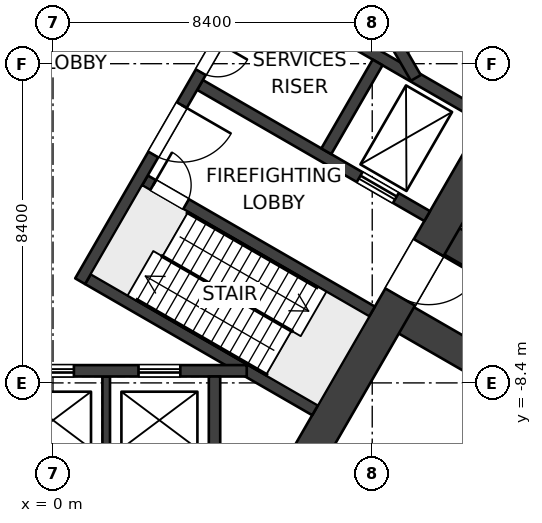
"""IFC4 building model, lengths in metres.
Left out: names, types, materials, properties, quantities, classifications, styles, units other than length and angle.
Written with IfcOpenShell. Run it as: python <this file> out.ifc"""

import sys

from ifc_helpers import new_model, si_unit, direction, frame, frame_2d, origin, place, context, subcontext, project, spatial, polyline, rectangle, outline, extrude, element, fill, save


model = new_model("IFC4")
c1 = context("Model", 3, precision=1e-05, world=origin(), true_north=direction((0.0, 1.0)))
c2 = subcontext(c1, "Body", "Model", "MODEL_VIEW")
j1 = project(units=[si_unit("LENGTHUNIT", "METRE"), si_unit("PLANEANGLEUNIT", "RADIAN")], contexts=[c1])
p1 = place(None, origin())
s1 = spatial("IfcSite", under=j1, at=p1, CompositionType="ELEMENT")
p2 = place(p1, origin())
s2 = spatial("IfcBuilding", under=s1, at=p2, CompositionType="ELEMENT")
p3 = place(p2, frame((0.0, 0.0, 11.0)))
s3 = spatial("IfcBuildingStorey", under=s2, at=p3, CompositionType="ELEMENT", Elevation=11.0)
p4 = place(p3, frame((12.551, -0.225, 0.0), z_axis=(0.0, 0.0, 1.0), x_axis=(-0.499997612506, -0.8660267822, 0.0)))
e1 = element("IfcWall", 1, at=p4, inside=s3, PredefinedType="SHEAR", context=c2, shape_type="SweptSolid", body=[
    extrude(rectangle(XDim=12.161, YDim=0.9, at=frame_2d((6.08, 0.0))), origin(), (0.0, 0.0, 1.0), 5.0),
])
p5 = place(p4, frame((5.33, 0.0, 0.0)))
e2 = element("IfcOpeningElement", 2, at=p5, cuts=e1, PredefinedType="OPENING", context=c2, shape_type="SweptSolid", body=[
    extrude(rectangle(XDim=1.5, YDim=2.1, at=frame_2d((0.75, 1.05))), frame((0.0, 0.46, 0.0), z_axis=(0.0, -1.0, 0.0), x_axis=(1.0, 0.0, 0.0)), (0.0, 0.0, 1.0), 0.92),
])
p6 = place(p3, origin())
e3 = element("IfcWall", 3, at=p6, inside=s3, PredefinedType="SHEAR", context=c2, shape_type="SweptSolid", body=[
    extrude(outline(polyline([(13.2, 0.0), (6.6, 11.432), (6.08, 11.432), (6.08, 10.531), (12.161, 0.0), (12.94, -0.45), (13.2, 0.0)])), origin(), (0.0, 0.0, 1.0), 5.0),
])
p7 = place(p3, frame((5.314, 2.244, 0.0), z_axis=(0.0, 0.0, 1.0), x_axis=(-0.499995050369, -0.866028261437, 0.0)))
e4 = element("IfcWall", 4, at=p7, inside=s3, PredefinedType="SHEAR", context=c2, shape_type="SweptSolid", body=[
    extrude(rectangle(XDim=9.2, YDim=0.3, at=frame_2d((4.6, 0.0))), origin(), (0.0, 0.0, 1.0), 5.0),
])
p8 = place(p7, frame((3.85, 0.0, 0.0)))
e5 = element("IfcOpeningElement", 5, at=p8, cuts=e4, PredefinedType="OPENING", context=c2, shape_type="SweptSolid", body=[
    extrude(rectangle(XDim=1.5, YDim=2.1, at=frame_2d((0.75, 1.05))), frame((0.0, 0.16, 0.0), z_axis=(0.0, -1.0, 0.0), x_axis=(1.0, 0.0, 0.0)), (0.0, 0.0, 1.0), 0.32),
])
p9 = place(p7, frame((1.95, 0.0, 0.0)))
e6 = element("IfcOpeningElement", 6, at=p9, cuts=e4, PredefinedType="OPENING", context=c2, shape_type="SweptSolid", body=[
    extrude(rectangle(XDim=0.9, YDim=2.1, at=frame_2d((0.45, 1.05))), frame((0.0, 0.16, 0.0), z_axis=(0.0, -1.0, 0.0), x_axis=(1.0, 0.0, 0.0)), (0.0, 0.0, 1.0), 0.32),
])
p10 = place(p3, frame((2.419, -3.071, 0.0), z_axis=(0.0, 0.0, 1.0), x_axis=(0.86602711848, -0.499997030048, 0.0)))
e7 = element("IfcWall", 7, at=p10, inside=s3, PredefinedType="SHEAR", context=c2, shape_type="SweptSolid", body=[
    extrude(rectangle(XDim=6.901, YDim=0.3, at=frame_2d((3.451, 0.0))), origin(), (0.0, 0.0, 1.0), 5.0),
])
p11 = place(p10, frame((0.25, 0.0, 0.0)))
e8 = element("IfcOpeningElement", 8, at=p11, cuts=e7, PredefinedType="OPENING", context=c2, shape_type="SweptSolid", body=[
    extrude(rectangle(XDim=1.0, YDim=2.1, at=frame_2d((0.5, 1.05))), frame((0.0, 0.16, 0.0), z_axis=(0.0, -1.0, 0.0), x_axis=(1.0, 0.0, 0.0)), (0.0, 0.0, 1.0), 0.32),
])
p12 = place(p3, frame((0.919, -5.669, 0.0), z_axis=(0.0, 0.0, 1.0), x_axis=(0.866011800373, -0.500023561059, 0.0)))
e9 = element("IfcWall", 9, at=p12, inside=s3, PredefinedType="SHEAR", context=c2, shape_type="SweptSolid", body=[
    extrude(rectangle(XDim=6.902, YDim=0.3, at=frame_2d((3.451, 0.0))), origin(), (0.0, 0.0, 1.0), 5.0),
])
p13 = place(p3, frame((3.869, -0.559, 0.0), z_axis=(0.0, 0.0, 1.0), x_axis=(0.86602711848, -0.499997030048, 0.0)))
e10 = element("IfcWall", 10, at=p13, inside=s3, PredefinedType="SHEAR", context=c2, shape_type="SweptSolid", body=[
    extrude(rectangle(XDim=6.901, YDim=0.3, at=frame_2d((3.451, 0.0))), origin(), (0.0, 0.0, 1.0), 5.0),
])
p14 = place(p13, frame((4.85, 0.0, 0.0)))
e11 = element("IfcOpeningElement", 11, at=p14, cuts=e10, PredefinedType="OPENING", context=c2, shape_type="SweptSolid", body=[
    extrude(rectangle(XDim=1.1, YDim=2.1, at=frame_2d((0.55, 1.05))), frame((0.0, 0.16, 0.0), z_axis=(0.0, -1.0, 0.0), x_axis=(1.0, 0.0, 0.0)), (0.0, 0.0, 1.0), 0.32),
])
p15 = place(p3, frame((5.369, 2.039, 0.0), z_axis=(0.0, 0.0, 1.0), x_axis=(0.86602711848, -0.499997030048, 0.0)))
e12 = element("IfcWall", 12, at=p15, inside=s3, PredefinedType="SHEAR", context=c2, shape_type="SweptSolid", body=[
    extrude(rectangle(XDim=6.901, YDim=0.3, at=frame_2d((3.451, 0.0))), origin(), (0.0, 0.0, 1.0), 5.0),
])
p16 = place(p3, frame((8.541, 0.034, 0.0), z_axis=(0.0, 0.0, 1.0), x_axis=(-0.50000943426, -0.866019956843, 0.0)))
e13 = element("IfcWall", 13, at=p16, inside=s3, PredefinedType="SHEAR", context=c2, shape_type="SweptSolid", body=[
    extrude(rectangle(XDim=2.7, YDim=0.3, at=frame_2d((1.35, 0.0))), origin(), (0.0, 0.0, 1.0), 5.0),
])
p17 = place(p3, frame((5.098, -8.082, 0.0), z_axis=(0.0, 0.0, 1.0), x_axis=(-1.0, 0.0, 0.0)))
e14 = element("IfcWall", 14, at=p17, inside=s3, PredefinedType="SHEAR", context=c2, shape_type="SweptSolid", body=[
    extrude(rectangle(XDim=10.195, YDim=0.3, at=frame_2d((5.098, 0.0))), origin(), (0.0, 0.0, 1.0), 5.0),
])
p18 = place(p17, frame((1.748, 0.0, 0.0)))
e15 = element("IfcOpeningElement", 15, at=p18, cuts=e14, PredefinedType="OPENING", context=c2, shape_type="SweptSolid", body=[
    extrude(rectangle(XDim=1.1, YDim=2.1, at=frame_2d((0.55, 1.05))), frame((0.0, 0.16, 0.0), z_axis=(0.0, -1.0, 0.0), x_axis=(1.0, 0.0, 0.0)), (0.0, 0.0, 1.0), 0.32),
])
p19 = place(p17, frame((4.548, 0.0, 0.0)))
e16 = element("IfcOpeningElement", 16, at=p19, cuts=e14, PredefinedType="OPENING", context=c2, shape_type="SweptSolid", body=[
    extrude(rectangle(XDim=1.1, YDim=2.1, at=frame_2d((0.55, 1.05))), frame((0.0, 0.16, 0.0), z_axis=(0.0, -1.0, 0.0), x_axis=(1.0, 0.0, 0.0)), (0.0, 0.0, 1.0), 0.32),
])
p20 = place(p17, frame((7.348, 0.0, 0.0)))
e17 = element("IfcOpeningElement", 17, at=p20, cuts=e14, PredefinedType="OPENING", context=c2, shape_type="SweptSolid", body=[
    extrude(rectangle(XDim=1.1, YDim=2.1, at=frame_2d((0.55, 1.05))), frame((0.0, 0.16, 0.0), z_axis=(0.0, -1.0, 0.0), x_axis=(1.0, 0.0, 0.0)), (0.0, 0.0, 1.0), 0.32),
])
p21 = place(p3, frame((4.25, -8.231, 0.0), z_axis=(0.0, 0.0, 1.0), x_axis=(0.0, -1.0, 0.0)))
e18 = element("IfcWall", 18, at=p21, inside=s3, PredefinedType="SHEAR", context=c2, shape_type="SweptSolid", body=[
    extrude(rectangle(XDim=2.3, YDim=0.3, at=frame_2d((1.15, 0.0))), origin(), (0.0, 0.0, 1.0), 5.0),
])
p22 = place(p3, frame((1.4, -8.231, 0.0), z_axis=(0.0, 0.0, 1.0), x_axis=(0.0, -1.0, 0.0)))
e19 = element("IfcWall", 19, at=p22, inside=s3, PredefinedType="SHEAR", context=c2, shape_type="SweptSolid", body=[
    extrude(rectangle(XDim=2.3, YDim=0.2, at=frame_2d((1.15, 0.0))), origin(), (0.0, 0.0, 1.0), 5.0),
])
p23 = place(p3, frame((4.45, 8.455, 0.0), z_axis=(0.0, 0.0, 1.0), x_axis=(0.500002290144, -0.866024081565, 0.0)))
e20 = element("IfcWall", 20, at=p23, inside=s3, PredefinedType="SHEAR", context=c2, shape_type="SweptSolid", body=[
    extrude(rectangle(XDim=10.195, YDim=0.3, at=frame_2d((5.098, 0.0))), origin(), (0.0, 0.0, 1.0), 5.0),
])
p24 = place(p3, frame((9.254, 0.435, 0.0), z_axis=(0.0, 0.0, 1.0), x_axis=(0.866007057882, 0.500031774688, 0.0)))
e21 = element("IfcWall", 21, at=p24, inside=s3, PredefinedType="SHEAR", context=c2, shape_type="SweptSolid", body=[
    extrude(rectangle(XDim=2.3, YDim=0.3, at=frame_2d((1.15, 0.0))), origin(), (0.0, 0.0, 1.0), 5.0),
])
p25 = place(p3, frame((10.11, -4.451, 0.0), z_axis=(0.0, 0.0, 1.0), x_axis=(0.866025284237, -0.500000207062, 0.0)))
e22 = element("IfcWall", 22, at=p25, inside=s3, PredefinedType="SHEAR", context=c2, shape_type="SweptSolid", body=[
    extrude(rectangle(XDim=36.75, YDim=0.8, at=frame_2d((18.375, 0.0))), origin(), (0.0, 0.0, 1.0), 5.0),
])
p26 = place(p25, frame((1.35, 0.0, 0.0)))
e23 = element("IfcOpeningElement", 23, at=p26, cuts=e22, PredefinedType="OPENING", context=c2, shape_type="SweptSolid", body=[
    extrude(rectangle(XDim=1.2, YDim=2.1, at=frame_2d((0.6, 1.05))), frame((0.0, 0.41, 0.0), z_axis=(0.0, -1.0, 0.0), x_axis=(1.0, 0.0, 0.0)), (0.0, 0.0, 1.0), 0.82),
])
p27 = place(p3, frame((8.91, -6.53, 0.0), z_axis=(0.0, 0.0, 1.0), x_axis=(0.866024404313, -0.500001731131, 0.0)))
e24 = element("IfcWall", 24, at=p27, inside=s3, PredefinedType="SHEAR", context=c2, shape_type="SweptSolid", body=[
    extrude(rectangle(XDim=36.953, YDim=0.8, at=frame_2d((18.477, 0.0))), origin(), (0.0, 0.0, 1.0), 5.0),
])
p28 = place(p27, frame((10.0, 0.0, 0.0)))
e25 = element("IfcOpeningElement", 25, at=p28, cuts=e24, PredefinedType="OPENING", context=c2, shape_type="SweptSolid", body=[
    extrude(rectangle(XDim=1.0, YDim=2.1, at=frame_2d((0.5, 1.05))), frame((0.0, 0.41, 0.0), z_axis=(0.0, -1.0, 0.0), x_axis=(1.0, 0.0, 0.0)), (0.0, 0.0, 1.0), 0.82),
])
p29 = place(p27, frame((2.85, 0.0, 0.0)))
e26 = element("IfcOpeningElement", 26, at=p29, cuts=e24, PredefinedType="OPENING", context=c2, shape_type="SweptSolid", body=[
    extrude(rectangle(XDim=1.2, YDim=2.1, at=frame_2d((0.6, 1.05))), frame((0.0, 0.41, 0.0), z_axis=(0.0, -1.0, 0.0), x_axis=(1.0, 0.0, 0.0)), (0.0, 0.0, 1.0), 0.82),
])
p30 = place(p3, frame((9.45, 6.495, 0.0), z_axis=(0.0, 0.0, 1.0), x_axis=(0.866025301493, -0.500000177174, 0.0)))
e27 = element("IfcWall", 27, at=p30, inside=s3, PredefinedType="SOLIDWALL", context=c2, shape_type="SweptSolid", body=[
    extrude(rectangle(XDim=43.095, YDim=0.3, at=frame_2d((21.548, 0.0))), origin(), (0.0, 0.0, 1.0), 4.7),
])
p31 = place(p30, frame((26.595, 0.0, 0.0)))
e28 = element("IfcOpeningElement", 28, at=p31, cuts=e27, PredefinedType="OPENING", context=c2, shape_type="SweptSolid", body=[
    extrude(rectangle(XDim=1.8, YDim=2.4, at=frame_2d((0.9, 1.2))), frame((0.0, 0.16, 0.0), z_axis=(0.0, -1.0, 0.0), x_axis=(1.0, 0.0, 0.0)), (0.0, 0.0, 1.0), 0.32),
])
p32 = place(p18, origin())
e29 = element("IfcDoor", 29, at=p32, inside=s3, OperationType="DOUBLE_DOOR_SLIDING", PredefinedType="DOOR", context=c2, shape_type="SweptSolid", body=[
    extrude(rectangle(XDim=1.1, YDim=2.1, at=frame_2d((0.55, 1.05))), frame((0.0, 0.025, 0.0), z_axis=(0.0, -1.0, 0.0), x_axis=(1.0, 0.0, 0.0)), (0.0, 0.0, 1.0), 0.05),
])
fill(e15, e29)
p33 = place(p19, origin())
e30 = element("IfcDoor", 30, at=p33, inside=s3, OperationType="DOUBLE_DOOR_SLIDING", PredefinedType="DOOR", context=c2, shape_type="SweptSolid", body=[
    extrude(rectangle(XDim=1.1, YDim=2.1, at=frame_2d((0.55, 1.05))), frame((0.0, 0.025, 0.0), z_axis=(0.0, -1.0, 0.0), x_axis=(1.0, 0.0, 0.0)), (0.0, 0.0, 1.0), 0.05),
])
fill(e16, e30)
p34 = place(p14, origin())
e31 = element("IfcDoor", 31, at=p34, inside=s3, OperationType="DOUBLE_DOOR_SLIDING", PredefinedType="DOOR", context=c2, shape_type="SweptSolid", body=[
    extrude(rectangle(XDim=1.1, YDim=2.1, at=frame_2d((0.55, 1.05))), frame((0.0, 0.025, 0.0), z_axis=(0.0, -1.0, 0.0), x_axis=(1.0, 0.0, 0.0)), (0.0, 0.0, 1.0), 0.05),
])
fill(e11, e31)
p35 = place(p8, origin())
e32 = element("IfcDoor", 32, at=p35, inside=s3, OperationType="DOUBLE_DOOR_DOUBLE_SWING", PredefinedType="DOOR", context=c2, shape_type="SweptSolid", body=[
    extrude(rectangle(XDim=1.5, YDim=2.1, at=frame_2d((0.75, 1.05))), frame((0.0, 0.025, 0.0), z_axis=(0.0, -1.0, 0.0), x_axis=(1.0, 0.0, 0.0)), (0.0, 0.0, 1.0), 0.05),
])
fill(e5, e32)
p36 = place(p9, origin())
e33 = element("IfcDoor", 33, at=p36, inside=s3, OperationType="SINGLE_SWING_LEFT", PredefinedType="DOOR", context=c2, shape_type="SweptSolid", body=[
    extrude(rectangle(XDim=0.9, YDim=2.1, at=frame_2d((0.45, 1.05))), frame((0.0, 0.025, 0.0), z_axis=(0.0, -1.0, 0.0), x_axis=(1.0, 0.0, 0.0)), (0.0, 0.0, 1.0), 0.05),
])
fill(e6, e33)
p37 = place(p11, origin())
e34 = element("IfcDoor", 34, at=p37, inside=s3, OperationType="SINGLE_SWING_LEFT", PredefinedType="DOOR", context=c2, shape_type="SweptSolid", body=[
    extrude(rectangle(XDim=1.0, YDim=2.1, at=frame_2d((0.5, 1.05))), frame((0.0, 0.025, 0.0), z_axis=(0.0, -1.0, 0.0), x_axis=(1.0, 0.0, 0.0)), (0.0, 0.0, 1.0), 0.05),
])
fill(e8, e34)
p38 = place(p5, origin())
e35 = element("IfcDoor", 35, at=p38, inside=s3, OperationType="DOUBLE_DOOR_DOUBLE_SWING", PredefinedType="DOOR", context=c2, shape_type="SweptSolid", body=[
    extrude(rectangle(XDim=1.5, YDim=2.1, at=frame_2d((0.75, 1.05))), frame((0.0, 0.025, 0.0), z_axis=(0.0, -1.0, 0.0), x_axis=(1.0, 0.0, 0.0)), (0.0, 0.0, 1.0), 0.05),
])
fill(e2, e35)
save(model, sys.argv[1])
